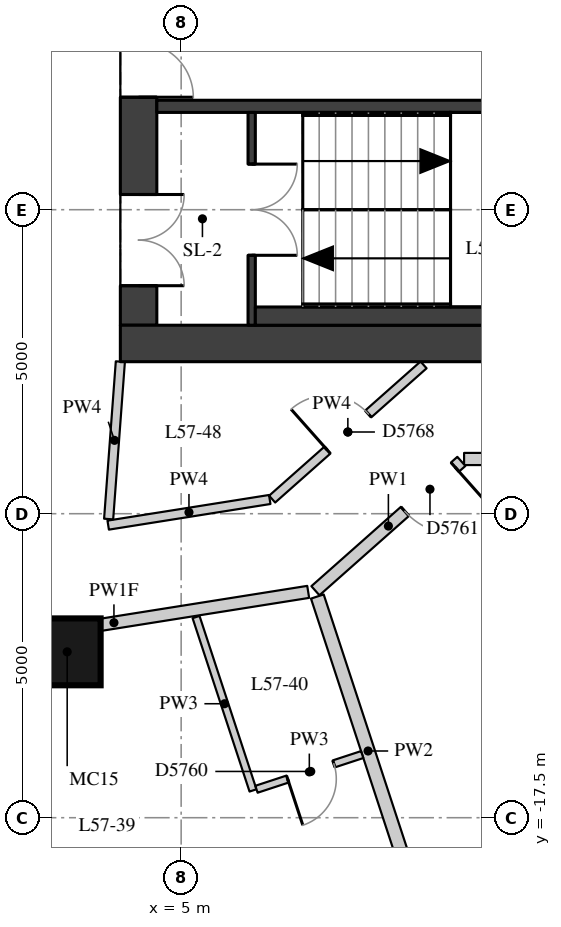
"""IFC4 building model, lengths in metres.
Left out: names, types, materials, properties, quantities, classifications, styles, units other than length and angle.
Written with IfcOpenShell. Run it as: python <this file> out.ifc"""

import sys

from ifc_helpers import new_model, si_unit, direction, frame, frame_2d, origin, origin_2d, place, context, subcontext, project, spatial, rectangle, extrude, element, fill, save


model = new_model("IFC4")
c1 = context("Model", 3, precision=1e-05, world=origin(), true_north=direction((0.0, 1.0)))
c2 = subcontext(c1, "Body", "Model", "MODEL_VIEW")
j1 = project(units=[si_unit("LENGTHUNIT", "METRE"), si_unit("PLANEANGLEUNIT", "RADIAN")], contexts=[c1])
p1 = place(None, origin())
s1 = spatial("IfcSite", under=j1, at=p1, CompositionType="ELEMENT")
p2 = place(p1, origin())
s2 = spatial("IfcBuilding", under=s1, at=p2, CompositionType="ELEMENT")
p3 = place(p2, frame((0.0, 0.0, 202.4)))
s3 = spatial("IfcBuildingStorey", under=s2, at=p3, CompositionType="ELEMENT", Elevation=202.4)
p4 = place(p3, frame((3.126, -14.772, 0.0), z_axis=(0.0, 0.0, 1.0), x_axis=(1.0, 0.0, 0.0)))
e1 = element("IfcColumn", 1, at=p4, inside=s3, PredefinedType="COLUMN", context=c2, shape_type="SweptSolid", body=[
    extrude(rectangle(XDim=1.1, YDim=1.1, at=origin_2d()), origin(), (0.0, 0.0, 1.0), 3.3),
])
p5 = place(p3, frame((4.3, -9.4, 0.0), z_axis=(0.0, 0.0, 1.0), x_axis=(0.0, 1.0, 0.0)))
e2 = element("IfcWall", 2, at=p5, inside=s3, PredefinedType="SHEAR", context=c2, shape_type="SweptSolid", body=[
    extrude(rectangle(XDim=18.8, YDim=0.6, at=frame_2d((9.4, 0.0))), origin(), (0.0, 0.0, 1.0), 3.02),
])
p6 = place(p5, frame((0.65, 0.0, 0.0)))
e3 = element("IfcOpeningElement", 3, at=p6, cuts=e2, PredefinedType="OPENING", context=c2, shape_type="SweptSolid", body=[
    extrude(rectangle(XDim=1.5, YDim=2.1, at=frame_2d((0.75, 1.05))), frame((0.0, 0.31, 0.0), z_axis=(0.0, -1.0, 0.0), x_axis=(1.0, 0.0, 0.0)), (0.0, 0.0, 1.0), 0.62),
])
p7 = place(p5, frame((3.75, 0.0, 0.0)))
e4 = element("IfcOpeningElement", 4, at=p7, cuts=e2, PredefinedType="OPENING", context=c2, shape_type="SweptSolid", body=[
    extrude(rectangle(XDim=1.8, YDim=2.1, at=frame_2d((0.9, 1.05))), frame((0.0, 0.31, 0.0), z_axis=(0.0, -1.0, 0.0), x_axis=(1.0, 0.0, 0.0)), (0.0, 0.0, 1.0), 0.62),
])
p8 = place(p5, frame((6.25, 0.0, 0.0)))
e5 = element("IfcOpeningElement", 5, at=p8, cuts=e2, PredefinedType="OPENING", context=c2, shape_type="SweptSolid", body=[
    extrude(rectangle(XDim=1.1, YDim=2.1, at=frame_2d((0.55, 1.05))), frame((0.0, 0.31, 0.0), z_axis=(0.0, -1.0, 0.0), x_axis=(1.0, 0.0, 0.0)), (0.0, 0.0, 1.0), 0.62),
])
p9 = place(p5, frame((8.9, 0.0, 0.0)))
e6 = element("IfcOpeningElement", 6, at=p9, cuts=e2, PredefinedType="OPENING", context=c2, shape_type="SweptSolid", body=[
    extrude(rectangle(XDim=1.0, YDim=2.1, at=frame_2d((0.5, 1.05))), frame((0.0, 0.31, 0.0), z_axis=(0.0, -1.0, 0.0), x_axis=(1.0, 0.0, 0.0)), (0.0, 0.0, 1.0), 0.62),
])
p10 = place(p5, frame((11.45, 0.0, 0.0)))
e7 = element("IfcOpeningElement", 7, at=p10, cuts=e2, PredefinedType="OPENING", context=c2, shape_type="SweptSolid", body=[
    extrude(rectangle(XDim=1.1, YDim=2.1, at=frame_2d((0.55, 1.05))), frame((0.0, 0.31, 0.0), z_axis=(0.0, -1.0, 0.0), x_axis=(1.0, 0.0, 0.0)), (0.0, 0.0, 1.0), 0.62),
])
p11 = place(p5, frame((13.25, 0.0, 0.0)))
e8 = element("IfcOpeningElement", 8, at=p11, cuts=e2, PredefinedType="OPENING", context=c2, shape_type="SweptSolid", body=[
    extrude(rectangle(XDim=1.8, YDim=2.1, at=frame_2d((0.9, 1.05))), frame((0.0, 0.31, 0.0), z_axis=(0.0, -1.0, 0.0), x_axis=(1.0, 0.0, 0.0)), (0.0, 0.0, 1.0), 0.62),
])
p12 = place(p5, frame((16.65, 0.0, 0.0)))
e9 = element("IfcOpeningElement", 9, at=p12, cuts=e2, PredefinedType="OPENING", context=c2, shape_type="SweptSolid", body=[
    extrude(rectangle(XDim=1.5, YDim=2.1, at=frame_2d((0.75, 1.05))), frame((0.0, 0.31, 0.0), z_axis=(0.0, -1.0, 0.0), x_axis=(1.0, 0.0, 0.0)), (0.0, 0.0, 1.0), 0.62),
])
p13 = place(p3, frame((4.0, -9.7, 0.0), z_axis=(0.0, 0.0, 1.0), x_axis=(1.0, 0.0, 0.0)))
e10 = element("IfcWall", 10, at=p13, inside=s3, PredefinedType="SHEAR", context=c2, shape_type="SweptSolid", body=[
    extrude(rectangle(XDim=12.0, YDim=0.6, at=frame_2d((6.0, 0.0))), origin(), (0.0, 0.0, 1.0), 3.02),
])
p14 = place(p3, frame((4.6, -5.8, 0.0), z_axis=(0.0, 0.0, 1.0), x_axis=(1.0, 0.0, 0.0)))
e11 = element("IfcWall", 11, at=p14, inside=s3, PredefinedType="SHEAR", context=c2, shape_type="SweptSolid", body=[
    extrude(rectangle(XDim=10.8, YDim=0.2, at=frame_2d((5.4, 0.0))), origin(), (0.0, 0.0, 1.0), 3.02),
])
p15 = place(p3, frame((6.16, -9.4, 0.0), z_axis=(0.0, 0.0, 1.0), x_axis=(0.0, 1.0, 0.0)))
e12 = element("IfcWall", 12, at=p15, inside=s3, PredefinedType="SHEAR", context=c2, shape_type="SweptSolid", body=[
    extrude(rectangle(XDim=3.5, YDim=0.12, at=frame_2d((1.75, 0.0))), origin(), (0.0, 0.0, 1.0), 3.02),
])
p16 = place(p15, frame((1.15, 0.0, 0.0)))
e13 = element("IfcOpeningElement", 13, at=p16, cuts=e12, PredefinedType="OPENING", context=c2, shape_type="SweptSolid", body=[
    extrude(rectangle(XDim=1.5, YDim=2.1, at=frame_2d((0.75, 1.05))), frame((0.0, 0.07, 0.0), z_axis=(0.0, -1.0, 0.0), x_axis=(1.0, 0.0, 0.0)), (0.0, 0.0, 1.0), 0.14),
])
p17 = place(p3, frame((6.22, -9.25, 0.0), z_axis=(0.0, 0.0, 1.0), x_axis=(1.0, 0.0, 0.0)))
e14 = element("IfcWall", 14, at=p17, inside=s3, PredefinedType="PARTITIONING", context=c2, shape_type="SweptSolid", body=[
    extrude(rectangle(XDim=4.88, YDim=0.3, at=frame_2d((2.44, 0.0))), origin(), (0.0, 0.0, 1.0), 3.02),
])
p18 = place(p3, frame((17.5, -11.6, 0.0), z_axis=(0.0, 0.0, 1.0), x_axis=(-1.0, 0.0, 0.0)))
e15 = element("IfcWall", 15, at=p18, inside=s3, PredefinedType="PARTITIONING", context=c2, shape_type="SweptSolid", body=[
    extrude(rectangle(XDim=7.847, YDim=0.2, at=frame_2d((3.923, 0.0))), origin(), (0.0, 0.0, 1.0), 3.02),
])
p19 = place(p3, frame((9.608, -11.64, 0.0), z_axis=(0.0, 0.0, 1.0), x_axis=(-0.748412200225, -0.663233879227, 0.0)))
e16 = element("IfcWall", 16, at=p19, inside=s3, PredefinedType="PARTITIONING", context=c2, shape_type="SweptSolid", body=[
    extrude(rectangle(XDim=3.207, YDim=0.2, at=frame_2d((1.604, 0.0))), origin(), (0.0, 0.0, 1.0), 3.02),
])
p20 = place(p19, frame((0.14, 0.0, 0.0)))
e17 = element("IfcOpeningElement", 17, at=p20, cuts=e16, PredefinedType="OPENING", context=c2, shape_type="SweptSolid", body=[
    extrude(rectangle(XDim=1.1, YDim=2.1, at=frame_2d((0.55, 1.05))), frame((0.0, 0.11, 0.0), z_axis=(0.0, -1.0, 0.0), x_axis=(1.0, 0.0, 0.0)), (0.0, 0.0, 1.0), 0.22),
])
p21 = place(p3, frame((7.089, -13.786, 0.0), z_axis=(0.0, 0.0, 1.0), x_axis=(-0.987636270411, -0.156762869867, 0.0)))
e18 = element("IfcWall", 18, at=p21, inside=s3, PredefinedType="PARTITIONING", context=c2, shape_type="SweptSolid", body=[
    extrude(rectangle(XDim=6.469, YDim=0.2, at=frame_2d((3.235, 0.0))), origin(), (0.0, 0.0, 1.0), 2.42),
])
p22 = place(p21, frame((5.016, 0.0, 0.0)))
e19 = element("IfcOpeningElement", 19, at=p22, cuts=e18, PredefinedType="OPENING", context=c2, shape_type="SweptSolid", body=[
    extrude(rectangle(XDim=1.1, YDim=2.1, at=frame_2d((0.55, 1.05))), frame((0.0, 0.11, 0.0), z_axis=(0.0, -1.0, 0.0), x_axis=(1.0, 0.0, 0.0)), (0.0, 0.0, 1.0), 0.22),
])
p23 = place(p3, frame((8.987, -10.052, 0.0), z_axis=(0.0, 0.0, 1.0), x_axis=(-0.74833949077, -0.66331591761, 0.0)))
e20 = element("IfcWall", 20, at=p23, inside=s3, PredefinedType="PARTITIONING", context=c2, shape_type="SweptSolid", body=[
    extrude(rectangle(XDim=3.328, YDim=0.15, at=frame_2d((1.664, 0.0))), origin(), (0.0, 0.0, 1.0), 3.02),
])
p24 = place(p23, frame((1.214, 0.0, 0.0)))
e21 = element("IfcOpeningElement", 21, at=p24, cuts=e20, PredefinedType="OPENING", context=c2, shape_type="SweptSolid", body=[
    extrude(rectangle(XDim=0.9, YDim=2.1, at=frame_2d((0.45, 1.05))), frame((0.0, 0.085, 0.0), z_axis=(0.0, -1.0, 0.0), x_axis=(1.0, 0.0, 0.0)), (0.0, 0.0, 1.0), 0.17),
])
p25 = place(p3, frame((6.457, -12.266, 0.0), z_axis=(0.0, 0.0, 1.0), x_axis=(-0.987639766053, -0.156740845063, 0.0)))
e22 = element("IfcWall", 22, at=p25, inside=s3, PredefinedType="PARTITIONING", context=c2, shape_type="SweptSolid", body=[
    extrude(rectangle(XDim=2.69, YDim=0.15, at=frame_2d((1.345, 0.0))), origin(), (0.0, 0.0, 1.0), 3.02),
])
p26 = place(p3, frame((3.807, -12.588, 0.0), z_axis=(0.0, 0.0, 1.0), x_axis=(0.07420077159, 0.997243323114, 0.0)))
e23 = element("IfcWall", 23, at=p26, inside=s3, PredefinedType="PARTITIONING", context=c2, shape_type="SweptSolid", body=[
    extrude(rectangle(XDim=2.596, YDim=0.15, at=frame_2d((1.298, 0.0))), origin(), (0.0, 0.0, 1.0), 3.02),
])
p27 = place(p3, frame((8.908, -18.944, 0.0), z_axis=(0.0, 0.0, 1.0), x_axis=(-0.311910788491, 0.950111393481, 0.0)))
e24 = element("IfcWall", 24, at=p27, inside=s3, PredefinedType="PARTITIONING", context=c2, shape_type="SweptSolid", body=[
    extrude(rectangle(XDim=5.348, YDim=0.22, at=frame_2d((2.674, 0.0))), origin(), (0.0, 0.0, 1.0), 3.02),
])
p28 = place(p3, frame((5.245, -14.2, 0.0), z_axis=(0.0, 0.0, 1.0), x_axis=(0.31202743032, -0.950073093361, 0.0)))
e25 = element("IfcWall", 25, at=p28, inside=s3, PredefinedType="PARTITIONING", context=c2, shape_type="SweptSolid", body=[
    extrude(rectangle(XDim=3.001, YDim=0.12, at=frame_2d((1.501, 0.0))), origin(), (0.0, 0.0, 1.0), 3.02),
])
p29 = place(p3, frame((6.239, -17.032, 0.0), z_axis=(0.0, 0.0, 1.0), x_axis=(0.950127811882, 0.311860771962, 0.0)))
e26 = element("IfcWall", 26, at=p29, inside=s3, PredefinedType="PARTITIONING", context=c2, shape_type="SweptSolid", body=[
    extrude(rectangle(XDim=1.83, YDim=0.12, at=frame_2d((0.915, 0.0))), origin(), (0.0, 0.0, 1.0), 3.02),
])
p30 = place(p29, frame((0.54, 0.0, 0.0)))
e27 = element("IfcOpeningElement", 27, at=p30, cuts=e26, PredefinedType="OPENING", context=c2, shape_type="SweptSolid", body=[
    extrude(rectangle(XDim=0.8, YDim=2.1, at=frame_2d((0.4, 1.05))), frame((0.0, 0.07, 0.0), z_axis=(0.0, -1.0, 0.0), x_axis=(1.0, 0.0, 0.0)), (0.0, 0.0, 1.0), 0.14),
])
p31 = place(p6, origin())
e28 = element("IfcDoor", 28, at=p31, inside=s3, OperationType="DOUBLE_DOOR_SINGLE_SWING", PredefinedType="DOOR", context=c2, shape_type="SweptSolid", body=[
    extrude(rectangle(XDim=1.5, YDim=2.1, at=frame_2d((0.75, 1.05))), frame((0.0, 0.025, 0.0), z_axis=(0.0, -1.0, 0.0), x_axis=(1.0, 0.0, 0.0)), (0.0, 0.0, 1.0), 0.05),
])
fill(e3, e28)
p32 = place(p7, origin())
e29 = element("IfcDoor", 29, at=p32, inside=s3, OperationType="DOUBLE_DOOR_SINGLE_SWING", PredefinedType="DOOR", context=c2, shape_type="SweptSolid", body=[
    extrude(rectangle(XDim=1.8, YDim=2.1, at=frame_2d((0.9, 1.05))), frame((0.0, 0.025, 0.0), z_axis=(0.0, -1.0, 0.0), x_axis=(1.0, 0.0, 0.0)), (0.0, 0.0, 1.0), 0.05),
])
fill(e4, e29)
p33 = place(p16, origin())
e30 = element("IfcDoor", 30, at=p33, inside=s3, OperationType="DOUBLE_DOOR_SINGLE_SWING", PredefinedType="DOOR", context=c2, shape_type="SweptSolid", body=[
    extrude(rectangle(XDim=1.5, YDim=2.1, at=frame_2d((0.75, 1.05))), frame((0.0, 0.025, 0.0), z_axis=(0.0, -1.0, 0.0), x_axis=(1.0, 0.0, 0.0)), (0.0, 0.0, 1.0), 0.05),
])
fill(e13, e30)
p34 = place(p30, origin())
e31 = element("IfcDoor", 31, at=p34, inside=s3, OperationType="SINGLE_SWING_RIGHT", PredefinedType="DOOR", context=c2, shape_type="SweptSolid", body=[
    extrude(rectangle(XDim=0.8, YDim=2.1, at=frame_2d((0.4, 1.05))), frame((0.0, 0.025, 0.0), z_axis=(0.0, -1.0, 0.0), x_axis=(1.0, 0.0, 0.0)), (0.0, 0.0, 1.0), 0.05),
])
fill(e27, e31)
p35 = place(p20, origin())
e32 = element("IfcDoor", 32, at=p35, inside=s3, OperationType="SINGLE_SWING_LEFT", PredefinedType="DOOR", context=c2, shape_type="SweptSolid", body=[
    extrude(rectangle(XDim=1.1, YDim=2.1, at=frame_2d((0.55, 1.05))), frame((0.0, 0.025, 0.0), z_axis=(0.0, -1.0, 0.0), x_axis=(1.0, 0.0, 0.0)), (0.0, 0.0, 1.0), 0.05),
])
fill(e17, e32)
p36 = place(p24, origin())
e33 = element("IfcDoor", 33, at=p36, inside=s3, OperationType="SINGLE_SWING_LEFT", PredefinedType="DOOR", context=c2, shape_type="SweptSolid", body=[
    extrude(rectangle(XDim=0.9, YDim=2.1, at=frame_2d((0.45, 1.05))), frame((0.0, 0.025, 0.0), z_axis=(0.0, -1.0, 0.0), x_axis=(1.0, 0.0, 0.0)), (0.0, 0.0, 1.0), 0.05),
])
fill(e21, e33)
save(model, sys.argv[1])
